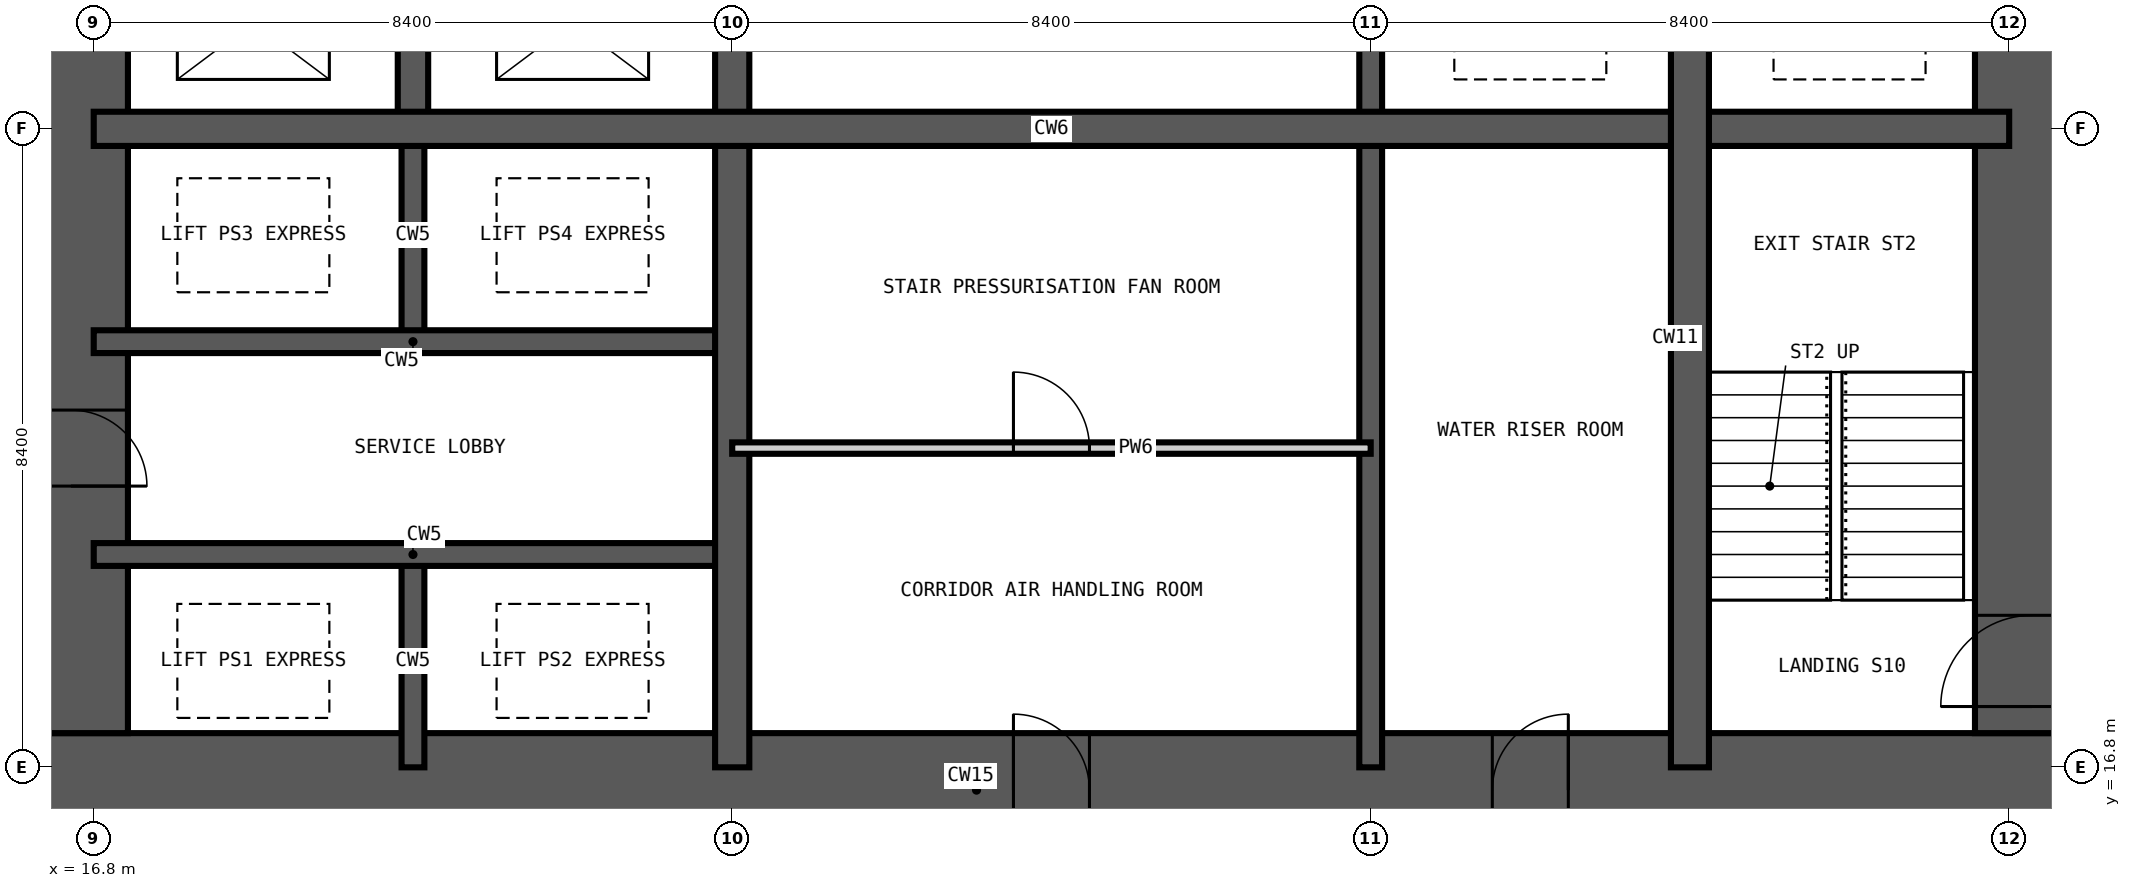
"""IFC4 building model, lengths in metres.
Left out: names, types, materials, properties, quantities, classifications, styles, units other than length and angle.
Written with IfcOpenShell. Run it as: python <this file> out.ifc"""

import sys

from ifc_helpers import new_model, si_unit, direction, frame, frame_2d, origin, place, context, subcontext, project, spatial, rectangle, extrude, element, fill, save


model = new_model("IFC4")
c1 = context("Model", 3, precision=1e-05, world=origin(), true_north=direction((0.0, 1.0)))
c2 = subcontext(c1, "Body", "Model", "MODEL_VIEW")
j1 = project(units=[si_unit("LENGTHUNIT", "METRE"), si_unit("PLANEANGLEUNIT", "RADIAN")], contexts=[c1])
p1 = place(None, origin())
s1 = spatial("IfcSite", under=j1, at=p1, CompositionType="ELEMENT")
p2 = place(p1, origin())
s2 = spatial("IfcBuilding", under=s1, at=p2, CompositionType="ELEMENT")
p3 = place(p2, frame((0.0, 0.0, 63.0)))
s3 = spatial("IfcBuildingStorey", under=s2, at=p3, CompositionType="ELEMENT", Elevation=63.0)
p4 = place(p3, frame((15.75, 16.5, -0.35), z_axis=(0.0, 0.0, 1.0), x_axis=(1.0, 0.0, 0.0)))
e1 = element("IfcWall", 1, at=p4, inside=s3, PredefinedType="SHEAR", context=c2, shape_type="SweptSolid", body=[
    extrude(rectangle(XDim=27.3, YDim=1.5, at=frame_2d((13.65, 0.0))), origin(), (0.0, 0.0, 1.0), 3.6),
])
p5 = place(p4, frame((13.15, 0.0, 0.35)))
e2 = element("IfcOpeningElement", 2, at=p5, cuts=e1, PredefinedType="OPENING", context=c2, shape_type="SweptSolid", body=[
    extrude(rectangle(XDim=1.0, YDim=2.1, at=frame_2d((0.5, 1.05))), frame((0.0, 0.76, 0.0), z_axis=(0.0, -1.0, 0.0), x_axis=(1.0, 0.0, 0.0)), (0.0, 0.0, 1.0), 1.52),
])
p6 = place(p4, frame((19.45, 0.0, 0.35)))
e3 = element("IfcOpeningElement", 3, at=p6, cuts=e1, PredefinedType="OPENING", context=c2, shape_type="SweptSolid", body=[
    extrude(rectangle(XDim=1.0, YDim=2.1, at=frame_2d((0.5, 1.05))), frame((0.0, 0.76, 0.0), z_axis=(0.0, -1.0, 0.0), x_axis=(1.0, 0.0, 0.0)), (0.0, 0.0, 1.0), 1.52),
])
p7 = place(p3, frame((42.3, 17.25, -0.35), z_axis=(0.0, 0.0, 1.0), x_axis=(0.0, 1.0, 0.0)))
e4 = element("IfcWall", 4, at=p7, inside=s3, PredefinedType="SHEAR", context=c2, shape_type="SweptSolid", body=[
    extrude(rectangle(XDim=24.3, YDim=1.5, at=frame_2d((12.15, 0.0))), origin(), (0.0, 0.0, 1.0), 3.6),
])
p8 = place(p7, frame((0.35, 0.0, 0.35)))
e5 = element("IfcOpeningElement", 5, at=p8, cuts=e4, PredefinedType="OPENING", context=c2, shape_type="SweptSolid", body=[
    extrude(rectangle(XDim=1.2, YDim=2.2, at=frame_2d((0.6, 1.1))), frame((0.0, 0.76, 0.0), z_axis=(0.0, -1.0, 0.0), x_axis=(1.0, 0.0, 0.0)), (0.0, 0.0, 1.0), 1.52),
])
p9 = place(p7, frame((11.65, 0.0, 0.35)))
e6 = element("IfcOpeningElement", 6, at=p9, cuts=e4, PredefinedType="OPENING", context=c2, shape_type="SweptSolid", body=[
    extrude(rectangle(XDim=1.0, YDim=2.1, at=frame_2d((0.5, 1.05))), frame((0.0, 0.76, 0.0), z_axis=(0.0, -1.0, 0.0), x_axis=(1.0, 0.0, 0.0)), (0.0, 0.0, 1.0), 1.52),
])
p10 = place(p7, frame((20.05, 0.0, 0.35)))
e7 = element("IfcOpeningElement", 7, at=p10, cuts=e4, PredefinedType="OPENING", context=c2, shape_type="SweptSolid", body=[
    extrude(rectangle(XDim=1.0, YDim=2.1, at=frame_2d((0.5, 1.05))), frame((0.0, 0.76, 0.0), z_axis=(0.0, -1.0, 0.0), x_axis=(1.0, 0.0, 0.0)), (0.0, 0.0, 1.0), 1.52),
])
p11 = place(p3, frame((16.5, 41.55, -0.35), z_axis=(0.0, 0.0, 1.0), x_axis=(0.0, -1.0, 0.0)))
e8 = element("IfcWall", 8, at=p11, inside=s3, PredefinedType="SHEAR", context=c2, shape_type="SweptSolid", body=[
    extrude(rectangle(XDim=24.3, YDim=1.5, at=frame_2d((12.15, 0.0))), origin(), (0.0, 0.0, 1.0), 3.6),
])
p12 = place(p11, frame((11.25, 0.0, 0.35)))
e9 = element("IfcOpeningElement", 9, at=p12, cuts=e8, PredefinedType="OPENING", context=c2, shape_type="SweptSolid", body=[
    extrude(rectangle(XDim=1.8, YDim=2.2, at=frame_2d((0.9, 1.1))), frame((0.0, 0.76, 0.0), z_axis=(0.0, -1.0, 0.0), x_axis=(1.0, 0.0, 0.0)), (0.0, 0.0, 1.0), 1.52),
])
p13 = place(p11, frame((20.05, 0.0, 0.35)))
e10 = element("IfcOpeningElement", 10, at=p13, cuts=e8, PredefinedType="OPENING", context=c2, shape_type="SweptSolid", body=[
    extrude(rectangle(XDim=1.0, YDim=2.1, at=frame_2d((0.5, 1.05))), frame((0.0, 0.76, 0.0), z_axis=(0.0, -1.0, 0.0), x_axis=(1.0, 0.0, 0.0)), (0.0, 0.0, 1.0), 1.52),
])
p14 = place(p11, frame((5.35, 0.0, 0.35)))
e11 = element("IfcOpeningElement", 11, at=p14, cuts=e8, PredefinedType="OPENING", context=c2, shape_type="SweptSolid", body=[
    extrude(rectangle(XDim=1.0, YDim=2.1, at=frame_2d((0.5, 1.05))), frame((0.0, 0.76, 0.0), z_axis=(0.0, -1.0, 0.0), x_axis=(1.0, 0.0, 0.0)), (0.0, 0.0, 1.0), 1.52),
])
for number, where, z_axis, x_axis in (
    (12, (21.0, 16.8, -0.35), (0.0, 0.0, 1.0), (0.0, 1.0, 0.0)),
    (13, (21.0, 22.4, -0.35), (0.0, 0.0, 1.0), (0.0, 1.0, 0.0)),
):
    element("IfcWall", number, at=place(p3, frame(where, z_axis=z_axis, x_axis=x_axis)), inside=s3, PredefinedType="SHEAR", context=c2, shape_type="SweptSolid", body=[
        extrude(rectangle(XDim=2.8, YDim=0.3, at=frame_2d((1.4, 0.0))), origin(), (0.0, 0.0, 1.0), 3.6),
    ])
p15 = place(p3, frame((33.6, 16.8, -0.35), z_axis=(0.0, 0.0, 1.0), x_axis=(0.0, 1.0, 0.0)))
e14 = element("IfcWall", 14, at=p15, inside=s3, PredefinedType="SHEAR", context=c2, shape_type="SweptSolid", body=[
    extrude(rectangle(XDim=25.2, YDim=0.3, at=frame_2d((12.6, 0.0))), origin(), (0.0, 0.0, 1.0), 3.6),
])
p16 = place(p15, frame((22.5, 0.0, 0.35)))
e15 = element("IfcOpeningElement", 15, at=p16, cuts=e14, PredefinedType="OPENING", context=c2, shape_type="SweptSolid", body=[
    extrude(rectangle(XDim=1.2, YDim=2.2, at=frame_2d((0.6, 1.1))), frame((0.0, 0.16, 0.0), z_axis=(0.0, -1.0, 0.0), x_axis=(1.0, 0.0, 0.0)), (0.0, 0.0, 1.0), 0.32),
])
p17 = place(p15, frame((18.3, 0.0, 0.35)))
e16 = element("IfcOpeningElement", 16, at=p17, cuts=e14, PredefinedType="OPENING", context=c2, shape_type="SweptSolid", body=[
    extrude(rectangle(XDim=1.2, YDim=2.2, at=frame_2d((0.6, 1.1))), frame((0.0, 0.16, 0.0), z_axis=(0.0, -1.0, 0.0), x_axis=(1.0, 0.0, 0.0)), (0.0, 0.0, 1.0), 0.32),
])
p18 = place(p15, frame((12.1, 0.0, 0.35)))
e17 = element("IfcOpeningElement", 17, at=p18, cuts=e14, PredefinedType="OPENING", context=c2, shape_type="SweptSolid", body=[
    extrude(rectangle(XDim=1.0, YDim=2.1, at=frame_2d((0.5, 1.05))), frame((0.0, 0.16, 0.0), z_axis=(0.0, -1.0, 0.0), x_axis=(1.0, 0.0, 0.0)), (0.0, 0.0, 1.0), 0.32),
])
for number, where, z_axis, x_axis in (
    (18, (16.8, 19.6, -0.35), (0.0, 0.0, 1.0), (1.0, 0.0, 0.0)),
    (19, (16.8, 22.4, -0.35), (0.0, 0.0, 1.0), (1.0, 0.0, 0.0)),
):
    element("IfcWall", number, at=place(p3, frame(where, z_axis=z_axis, x_axis=x_axis)), inside=s3, PredefinedType="SHEAR", context=c2, shape_type="SweptSolid", body=[
        extrude(rectangle(XDim=8.4, YDim=0.3, at=frame_2d((4.2, 0.0))), origin(), (0.0, 0.0, 1.0), 3.6),
    ])
p19 = place(p3, frame((21.0, 25.2, -0.35), z_axis=(0.0, 0.0, 1.0), x_axis=(0.0, 1.0, 0.0)))
e20 = element("IfcWall", 20, at=p19, inside=s3, PredefinedType="SHEAR", context=c2, shape_type="SweptSolid", body=[
    extrude(rectangle(XDim=2.8, YDim=0.4, at=frame_2d((1.4, 0.0))), origin(), (0.0, 0.0, 1.0), 3.6),
])
for number, where, z_axis, x_axis in (
    (21, (25.2, 16.8, -0.35), (0.0, 0.0, 1.0), (0.0, 1.0, 0.0)),
    (22, (16.8, 25.2, -0.35), (0.0, 0.0, 1.0), (1.0, 0.0, 0.0)),
):
    element("IfcWall", number, at=place(p3, frame(where, z_axis=z_axis, x_axis=x_axis)), inside=s3, PredefinedType="SHEAR", context=c2, shape_type="SweptSolid", body=[
        extrude(rectangle(XDim=25.2, YDim=0.45, at=frame_2d((12.6, 0.0))), origin(), (0.0, 0.0, 1.0), 3.6),
    ])
p20 = place(p3, frame((37.8, 16.8, -0.35), z_axis=(0.0, 0.0, 1.0), x_axis=(0.0, 1.0, 0.0)))
e23 = element("IfcWall", 23, at=p20, inside=s3, PredefinedType="SHEAR", context=c2, shape_type="SweptSolid", body=[
    extrude(rectangle(XDim=11.2, YDim=0.5, at=frame_2d((5.6, 0.0))), origin(), (0.0, 0.0, 1.0), 3.6),
])
p21 = place(p3, frame((25.2, 21.0, 0.0), z_axis=(0.0, 0.0, 1.0), x_axis=(1.0, 0.0, 0.0)))
e24 = element("IfcWall", 24, at=p21, inside=s3, PredefinedType="PARTITIONING", context=c2, shape_type="SweptSolid", body=[
    extrude(rectangle(XDim=8.4, YDim=0.15, at=frame_2d((4.2, 0.0))), origin(), (0.0, 0.0, 1.0), 3.25),
])
p22 = place(p21, frame((3.7, 0.0, 0.0)))
e25 = element("IfcOpeningElement", 25, at=p22, cuts=e24, PredefinedType="OPENING", context=c2, shape_type="SweptSolid", body=[
    extrude(rectangle(XDim=1.0, YDim=2.1, at=frame_2d((0.5, 1.05))), frame((0.0, 0.085, 0.0), z_axis=(0.0, -1.0, 0.0), x_axis=(1.0, 0.0, 0.0)), (0.0, 0.0, 1.0), 0.17),
])
p23 = place(p8, origin())
e26 = element("IfcDoor", 26, at=p23, inside=s3, OperationType="SINGLE_SWING_LEFT", PredefinedType="DOOR", context=c2, shape_type="SweptSolid", body=[
    extrude(rectangle(XDim=1.2, YDim=2.2, at=frame_2d((0.6, 1.1))), frame((0.0, 0.025, 0.0), z_axis=(0.0, -1.0, 0.0), x_axis=(1.0, 0.0, 0.0)), (0.0, 0.0, 1.0), 0.05),
])
fill(e5, e26)
p24 = place(p13, origin())
e27 = element("IfcDoor", 27, at=p24, inside=s3, OperationType="SINGLE_SWING_RIGHT", PredefinedType="DOOR", context=c2, shape_type="SweptSolid", body=[
    extrude(rectangle(XDim=1.0, YDim=2.1, at=frame_2d((0.5, 1.05))), frame((0.0, 0.025, 0.0), z_axis=(0.0, -1.0, 0.0), x_axis=(1.0, 0.0, 0.0)), (0.0, 0.0, 1.0), 0.05),
])
fill(e10, e27)
p25 = place(p5, origin())
e28 = element("IfcDoor", 28, at=p25, inside=s3, OperationType="SINGLE_SWING_LEFT", PredefinedType="DOOR", context=c2, shape_type="SweptSolid", body=[
    extrude(rectangle(XDim=1.0, YDim=2.1, at=frame_2d((0.5, 1.05))), frame((0.0, 0.025, 0.0), z_axis=(0.0, -1.0, 0.0), x_axis=(1.0, 0.0, 0.0)), (0.0, 0.0, 1.0), 0.05),
])
fill(e2, e28)
p26 = place(p22, origin())
e29 = element("IfcDoor", 29, at=p26, inside=s3, OperationType="SINGLE_SWING_LEFT", PredefinedType="DOOR", context=c2, shape_type="SweptSolid", body=[
    extrude(rectangle(XDim=1.0, YDim=2.1, at=frame_2d((0.5, 1.05))), frame((0.0, 0.025, 0.0), z_axis=(0.0, -1.0, 0.0), x_axis=(1.0, 0.0, 0.0)), (0.0, 0.0, 1.0), 0.05),
])
fill(e25, e29)
p27 = place(p6, origin())
e30 = element("IfcDoor", 30, at=p27, inside=s3, OperationType="SINGLE_SWING_RIGHT", PredefinedType="DOOR", context=c2, shape_type="SweptSolid", body=[
    extrude(rectangle(XDim=1.0, YDim=2.1, at=frame_2d((0.5, 1.05))), frame((0.0, 0.025, 0.0), z_axis=(0.0, -1.0, 0.0), x_axis=(1.0, 0.0, 0.0)), (0.0, 0.0, 1.0), 0.05),
])
fill(e3, e30)
save(model, sys.argv[1])
